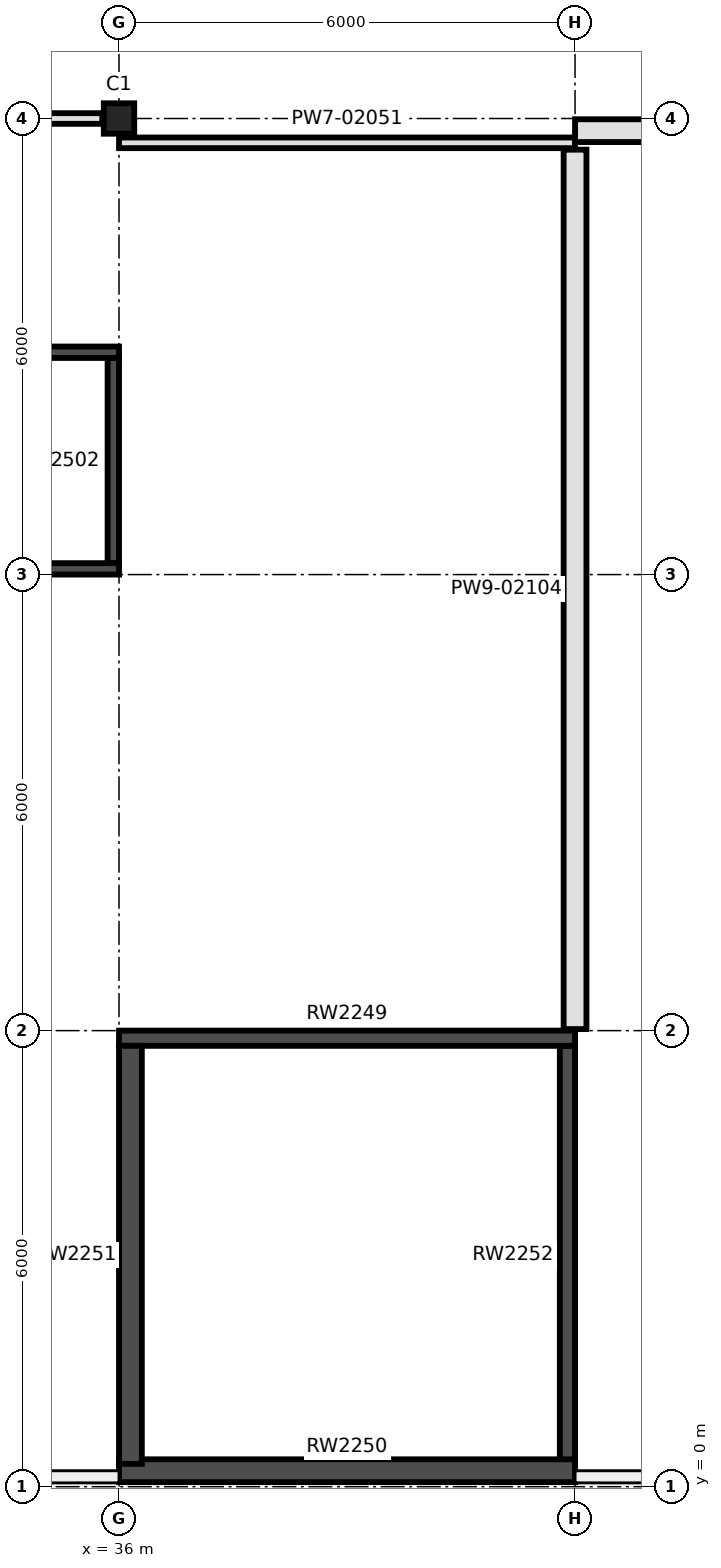
"""IFC4 building model, lengths in metres.
Left out: names, types, materials, properties, quantities, classifications, styles, units other than length and angle.
Written with IfcOpenShell. Run it as: python <this file> out.ifc"""

import sys

from ifc_helpers import new_model, si_unit, direction, frame, frame_2d, origin, origin_2d, place, context, subcontext, project, spatial, rectangle, extrude, element, fill, save


model = new_model("IFC4")
c1 = context("Model", 3, precision=1e-05, world=origin(), true_north=direction((0.0, 1.0)))
c2 = subcontext(c1, "Body", "Model", "MODEL_VIEW")
j1 = project(units=[si_unit("LENGTHUNIT", "METRE"), si_unit("PLANEANGLEUNIT", "RADIAN")], contexts=[c1])
p1 = place(None, origin())
s1 = spatial("IfcSite", under=j1, at=p1, CompositionType="ELEMENT")
p2 = place(p1, origin())
s2 = spatial("IfcBuilding", under=s1, at=p2, CompositionType="ELEMENT")
p3 = place(p2, frame((0.0, 0.0, 12.0)))
s3 = spatial("IfcBuildingStorey", under=s2, at=p3, CompositionType="ELEMENT", Elevation=12.0)
p4 = place(p3, frame((36.0, 18.0, 0.0), z_axis=(0.0, 0.0, 1.0), x_axis=(1.0, 0.0, 0.0)))
e1 = element("IfcColumn", 1, at=p4, inside=s3, PredefinedType="COLUMN", context=c2, shape_type="SweptSolid", body=[
    extrude(rectangle(XDim=0.4, YDim=0.4, at=origin_2d()), origin(), (0.0, 0.0, 1.0), 4.5),
])
p5 = place(p3, frame((36.0, 5.9, 0.0), z_axis=(0.0, 0.0, 1.0), x_axis=(1.0, 0.0, 0.0)))
e2 = element("IfcWall", 2, at=p5, inside=s3, PredefinedType="SHEAR", context=c2, shape_type="SweptSolid", body=[
    extrude(rectangle(XDim=6.0, YDim=0.2, at=frame_2d((3.0, 0.0))), origin(), (0.0, 0.0, 1.0), 4.5),
])
p6 = place(p5, frame((0.3, 0.0, 0.0)))
e3 = element("IfcOpeningElement", 3, at=p6, cuts=e2, PredefinedType="OPENING", context=c2, shape_type="SweptSolid", body=[
    extrude(rectangle(XDim=1.1, YDim=2.2, at=frame_2d((0.55, 1.1))), frame((0.0, 0.11, 0.0), z_axis=(0.0, -1.0, 0.0), x_axis=(1.0, 0.0, 0.0)), (0.0, 0.0, 1.0), 0.22),
])
p7 = place(p3, frame((36.0, 0.21, 0.0), z_axis=(0.0, 0.0, 1.0), x_axis=(1.0, 0.0, 0.0)))
e4 = element("IfcWall", 4, at=p7, inside=s3, PredefinedType="SHEAR", context=c2, shape_type="SweptSolid", body=[
    extrude(rectangle(XDim=6.0, YDim=0.3, at=frame_2d((3.0, 0.0))), origin(), (0.0, 0.0, 1.0), 4.5),
])
p8 = place(p3, frame((36.15, 0.3, 0.0), z_axis=(0.0, 0.0, 1.0), x_axis=(0.0, 1.0, 0.0)))
e5 = element("IfcWall", 5, at=p8, inside=s3, PredefinedType="SHEAR", context=c2, shape_type="SweptSolid", body=[
    extrude(rectangle(XDim=5.5, YDim=0.3, at=frame_2d((2.75, 0.0))), origin(), (0.0, 0.0, 1.0), 4.5),
])
p9 = place(p8, frame((1.8, 0.0, 0.0)))
e6 = element("IfcOpeningElement", 6, at=p9, cuts=e5, PredefinedType="OPENING", context=c2, shape_type="SweptSolid", body=[
    extrude(rectangle(XDim=1.8, YDim=2.2, at=frame_2d((0.9, 1.1))), frame((0.0, 0.16, 0.0), z_axis=(0.0, -1.0, 0.0), x_axis=(1.0, 0.0, 0.0)), (0.0, 0.0, 1.0), 0.32),
])
p10 = place(p3, frame((41.9, 0.3, 0.0), z_axis=(0.0, 0.0, 1.0), x_axis=(0.0, 1.0, 0.0)))
e7 = element("IfcWall", 7, at=p10, inside=s3, PredefinedType="SHEAR", context=c2, shape_type="SweptSolid", body=[
    extrude(rectangle(XDim=5.5, YDim=0.2, at=frame_2d((2.75, 0.0))), origin(), (0.0, 0.0, 1.0), 4.5),
])
for number, where, z_axis, x_axis in (
    (8, (33.0, 14.925, 0.0), (0.0, 0.0, 1.0), (1.0, 0.0, 0.0)),
    (9, (33.0, 12.075, 0.0), (0.0, 0.0, 1.0), (1.0, 0.0, 0.0)),
):
    element("IfcWall", number, at=place(p3, frame(where, z_axis=z_axis, x_axis=x_axis)), inside=s3, PredefinedType="SHEAR", context=c2, shape_type="SweptSolid", body=[
        extrude(rectangle(XDim=3.0, YDim=0.15, at=frame_2d((1.5, 0.0))), origin(), (0.0, 0.0, 1.0), 4.5),
    ])
p11 = place(p3, frame((35.925, 12.15, 0.0), z_axis=(0.0, 0.0, 1.0), x_axis=(0.0, 1.0, 0.0)))
e10 = element("IfcWall", 10, at=p11, inside=s3, PredefinedType="SHEAR", context=c2, shape_type="SweptSolid", body=[
    extrude(rectangle(XDim=2.7, YDim=0.15, at=frame_2d((1.35, 0.0))), origin(), (0.0, 0.0, 1.0), 4.5),
])
p12 = place(p2, frame((0.0, 0.0, 7.0)))
s4 = spatial("IfcBuildingStorey", under=s2, at=p12, CompositionType="ELEMENT", Elevation=7.0)
p13 = place(p12, frame((47.8, 0.375, 0.0), z_axis=(0.0, 0.0, 1.0), x_axis=(-1.0, 0.0, 0.0)))
e11 = element("IfcWall", 11, at=p13, inside=s4, PredefinedType="SOLIDWALL", context=c2, shape_type="SweptSolid", body=[
    extrude(rectangle(XDim=5.8, YDim=0.25, at=frame_2d((2.9, 0.0))), origin(), (0.0, 0.0, 1.0), 9.5),
])
p14 = place(p3, frame((30.22, 18.0, 0.0), z_axis=(0.0, 0.0, 1.0), x_axis=(1.0, 0.0, 0.0)))
e12 = element("IfcWall", 12, at=p14, inside=s3, PredefinedType="PARTITIONING", context=c2, shape_type="SweptSolid", body=[
    extrude(rectangle(XDim=5.56, YDim=0.14, at=frame_2d((2.78, 0.0))), origin(), (0.0, 0.0, 1.0), 3.9),
])
p15 = place(p14, frame((0.33, 0.0, 0.0)))
e13 = element("IfcOpeningElement", 13, at=p15, cuts=e12, PredefinedType="OPENING", context=c2, shape_type="SweptSolid", body=[
    extrude(rectangle(XDim=1.8, YDim=2.1, at=frame_2d((0.9, 1.05))), frame((0.0, 0.08, 0.0), z_axis=(0.0, -1.0, 0.0), x_axis=(1.0, 0.0, 0.0)), (0.0, 0.0, 1.0), 0.16),
])
p16 = place(p14, frame((3.33, 0.0, 0.0)))
e14 = element("IfcOpeningElement", 14, at=p16, cuts=e12, PredefinedType="OPENING", context=c2, shape_type="SweptSolid", body=[
    extrude(rectangle(XDim=1.8, YDim=2.1, at=frame_2d((0.9, 1.05))), frame((0.0, 0.08, 0.0), z_axis=(0.0, -1.0, 0.0), x_axis=(1.0, 0.0, 0.0)), (0.0, 0.0, 1.0), 0.16),
])
p17 = place(p3, frame((36.0, 17.68, 0.0), z_axis=(0.0, 0.0, 1.0), x_axis=(1.0, 0.0, 0.0)))
e15 = element("IfcWall", 15, at=p17, inside=s3, PredefinedType="PARTITIONING", context=c2, shape_type="SweptSolid", body=[
    extrude(rectangle(XDim=6.0, YDim=0.14, at=frame_2d((3.0, 0.0))), origin(), (0.0, 0.0, 1.0), 4.28),
])
p18 = place(p3, frame((42.0, 17.84, 0.0), z_axis=(0.0, 0.0, 1.0), x_axis=(1.0, 0.0, 0.0)))
e16 = element("IfcWall", 16, at=p18, inside=s3, PredefinedType="PARTITIONING", context=c2, shape_type="SweptSolid", body=[
    extrude(rectangle(XDim=12.2, YDim=0.3, at=frame_2d((6.1, 0.0))), origin(), (0.0, 0.0, 1.0), 4.28),
])
p19 = place(p3, frame((42.0, 6.02, 0.0), z_axis=(0.0, 0.0, 1.0), x_axis=(0.0, 1.0, 0.0)))
e17 = element("IfcWall", 17, at=p19, inside=s3, PredefinedType="PARTITIONING", context=c2, shape_type="SweptSolid", body=[
    extrude(rectangle(XDim=11.57, YDim=0.3, at=frame_2d((5.785, 0.0))), origin(), (0.0, 0.0, 1.0), 4.28),
])
p20 = place(p9, frame((1.8, 0.0, 0.0), z_axis=(0.0, 0.0, 1.0), x_axis=(-1.0, 0.0, 0.0)))
e18 = element("IfcDoor", 18, at=p20, inside=s3, OperationType="DOUBLE_DOOR_SINGLE_SWING", PredefinedType="DOOR", context=c2, shape_type="SweptSolid", body=[
    extrude(rectangle(XDim=1.8, YDim=2.2, at=frame_2d((0.9, 1.1))), frame((0.0, 0.025, 0.0), z_axis=(0.0, -1.0, 0.0), x_axis=(1.0, 0.0, 0.0)), (0.0, 0.0, 1.0), 0.05),
])
fill(e6, e18)
p21 = place(p6, frame((1.1, 0.0, 0.0), z_axis=(0.0, 0.0, 1.0), x_axis=(-1.0, 0.0, 0.0)))
e19 = element("IfcDoor", 19, at=p21, inside=s3, OperationType="SINGLE_SWING_LEFT", PredefinedType="DOOR", context=c2, shape_type="SweptSolid", body=[
    extrude(rectangle(XDim=1.1, YDim=2.2, at=frame_2d((0.55, 1.1))), frame((0.0, 0.025, 0.0), z_axis=(0.0, -1.0, 0.0), x_axis=(1.0, 0.0, 0.0)), (0.0, 0.0, 1.0), 0.05),
])
fill(e3, e19)
p22 = place(p16, origin())
e20 = element("IfcDoor", 20, at=p22, inside=s3, OperationType="DOUBLE_DOOR_SINGLE_SWING", PredefinedType="DOOR", context=c2, shape_type="SweptSolid", body=[
    extrude(rectangle(XDim=1.8, YDim=2.1, at=frame_2d((0.9, 1.05))), frame((0.0, 0.025, 0.0), z_axis=(0.0, -1.0, 0.0), x_axis=(1.0, 0.0, 0.0)), (0.0, 0.0, 1.0), 0.05),
])
fill(e14, e20)
save(model, sys.argv[1])
